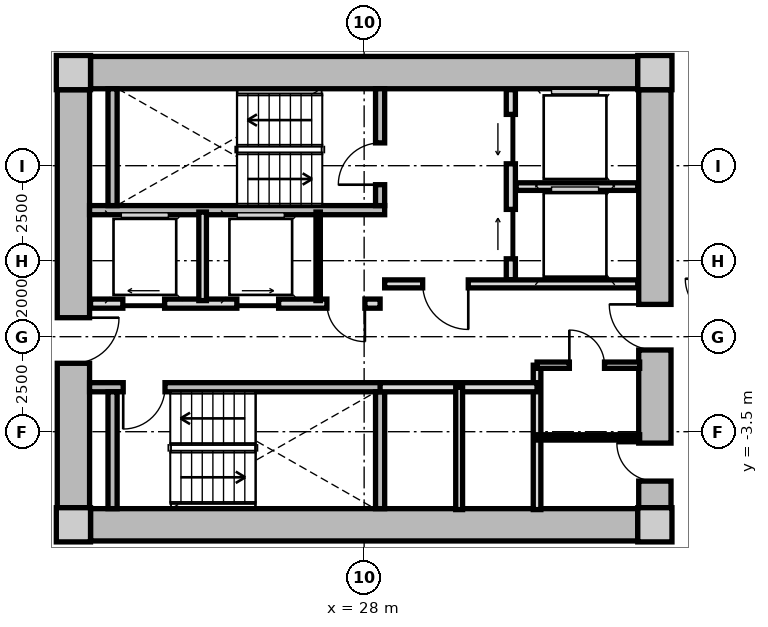
"""IFC4 building model, lengths in metres.
Left out: names, types, materials, properties, quantities, classifications, styles, units other than length and angle.
Written with IfcOpenShell. Run it as: python <this file> out.ifc"""

import sys

from ifc_helpers import new_model, si_unit, direction, frame, frame_2d, origin, origin_2d, place, context, subcontext, project, spatial, rectangle, extrude, source, transform, mapped, element, fill, save


model = new_model("IFC4")
c1 = context("Model", 3, precision=1e-05, world=origin(), true_north=direction((0.0, 1.0)))
c2 = subcontext(c1, "Body", "Model", "MODEL_VIEW")
j1 = project(units=[si_unit("LENGTHUNIT", "METRE"), si_unit("PLANEANGLEUNIT", "RADIAN")], contexts=[c1])
p1 = place(None, origin())
s1 = spatial("IfcSite", under=j1, at=p1, CompositionType="ELEMENT")
p2 = place(p1, origin())
s2 = spatial("IfcBuilding", under=s1, at=p2, CompositionType="ELEMENT")
p3 = place(p2, frame((0.0, 0.0, 58.2)))
s3 = spatial("IfcBuildingStorey", under=s2, at=p3, CompositionType="ELEMENT", Elevation=58.2)
m1 = source(origin(), c2, "Body", "SweptSolid", [
    extrude(rectangle(XDim=0.9, YDim=0.9, at=origin_2d()), origin(), (0.0, 0.0, 1.0), 3.05),
])
for number, where, z_axis, x_axis in (
    (1, (20.35, -5.95, 0.0), (0.0, 0.0, 1.0), (1.0, 0.0, 0.0)),
    (2, (35.65, -5.95, 0.0), (0.0, 0.0, 1.0), (1.0, 0.0, 0.0)),
    (3, (35.65, 5.95, 0.0), (0.0, 0.0, 1.0), (1.0, 0.0, 0.0)),
    (4, (20.35, 5.95, 0.0), (0.0, 0.0, 1.0), (1.0, 0.0, 0.0)),
):
    element("IfcColumn", number, at=place(p3, frame(where, z_axis=z_axis, x_axis=x_axis)), inside=s3, PredefinedType="COLUMN", context=c2, shape_type="MappedRepresentation", body=[
        mapped(m1, transform((0.0, 0.0, 0.0), x_axis=(1.0, 0.0, 0.0), y_axis=(0.0, 1.0, 0.0), z_axis=(0.0, 0.0, 1.0), scale=1.0)),
    ])
m2 = source(origin(), c2, "Body", "SweptSolid", [
    extrude(rectangle(XDim=14.4, YDim=0.85, at=frame_2d((7.2, 0.0))), origin(), (0.0, 0.0, 1.0), 2.79),
])
for number, where, z_axis, x_axis in (
    (5, (20.8, 5.95, 0.0), (0.0, 0.0, 1.0), (1.0, 0.0, 0.0)),
    (6, (35.2, -5.95, 0.0), (0.0, 0.0, 1.0), (-1.0, 0.0, 0.0)),
):
    element("IfcWall", number, at=place(p3, frame(where, z_axis=z_axis, x_axis=x_axis)), inside=s3, PredefinedType="SHEAR", context=c2, shape_type="MappedRepresentation", body=[
        mapped(m2, transform((0.0, 0.0, 0.0), x_axis=(1.0, 0.0, 0.0), y_axis=(0.0, 1.0, 0.0), z_axis=(0.0, 0.0, 1.0), scale=1.0)),
    ])
m3 = source(origin(), c2, "Body", "SweptSolid", [
    extrude(rectangle(XDim=11.0, YDim=0.85, at=frame_2d((5.5, 0.0))), origin(), (0.0, 0.0, 1.0), 2.79),
])
p4 = place(p3, frame((20.35, -5.5, 0.0), z_axis=(0.0, 0.0, 1.0), x_axis=(0.0, 1.0, 0.0)))
e7 = element("IfcWall", 7, at=p4, inside=s3, PredefinedType="SHEAR", context=c2, shape_type="MappedRepresentation", body=[
    mapped(m3, transform((0.0, 0.0, 0.0), x_axis=(1.0, 0.0, 0.0), y_axis=(0.0, 1.0, 0.0), z_axis=(0.0, 0.0, 1.0), scale=1.0)),
])
p5 = place(p4, frame((3.8, 0.0, 0.0)))
e8 = element("IfcOpeningElement", 8, at=p5, cuts=e7, PredefinedType="OPENING", context=c2, shape_type="SweptSolid", body=[
    extrude(rectangle(XDim=1.2, YDim=2.15, at=frame_2d((0.6, 1.075))), frame((0.0, 0.435, 0.0), z_axis=(0.0, -1.0, 0.0), x_axis=(1.0, 0.0, 0.0)), (0.0, 0.0, 1.0), 0.87),
])
p6 = place(p3, frame((35.65, 5.5, 0.0), z_axis=(0.0, 0.0, 1.0), x_axis=(0.0, -1.0, 0.0)))
e9 = element("IfcWall", 9, at=p6, inside=s3, PredefinedType="SHEAR", context=c2, shape_type="MappedRepresentation", body=[
    mapped(m3, transform((0.0, 0.0, 0.0), x_axis=(1.0, 0.0, 0.0), y_axis=(0.0, 1.0, 0.0), z_axis=(0.0, 0.0, 1.0), scale=1.0)),
])
p7 = place(p6, frame((5.65, 0.0, 0.0)))
e10 = element("IfcOpeningElement", 10, at=p7, cuts=e9, PredefinedType="OPENING", context=c2, shape_type="SweptSolid", body=[
    extrude(rectangle(XDim=1.2, YDim=2.15, at=frame_2d((0.6, 1.075))), frame((0.0, 0.435, 0.0), z_axis=(0.0, -1.0, 0.0), x_axis=(1.0, 0.0, 0.0)), (0.0, 0.0, 1.0), 0.87),
])
p8 = place(p6, frame((9.3, 0.0, 0.0)))
e11 = element("IfcOpeningElement", 11, at=p8, cuts=e9, PredefinedType="OPENING", context=c2, shape_type="SweptSolid", body=[
    extrude(rectangle(XDim=1.0, YDim=2.1, at=frame_2d((0.5, 1.05))), frame((0.0, 0.435, 0.0), z_axis=(0.0, -1.0, 0.0), x_axis=(1.0, 0.0, 0.0)), (0.0, 0.0, 1.0), 0.87),
])
m4 = source(origin(), c2, "Body", "SweptSolid", [
    extrude(rectangle(XDim=7.765, YDim=0.24, at=frame_2d((3.883, 0.0))), origin(), (0.0, 0.0, 1.0), 2.79),
])
p9 = place(p3, frame((20.775, 2.33, 0.0), z_axis=(0.0, 0.0, 1.0), x_axis=(1.0, 0.0, 0.0)))
e12 = element("IfcWall", 12, at=p9, inside=s3, PredefinedType="PARTITIONING", context=c2, shape_type="MappedRepresentation", body=[
    mapped(m4, transform((0.0, 0.0, 0.0), x_axis=(1.0, 0.0, 0.0), y_axis=(0.0, 1.0, 0.0), z_axis=(0.0, 0.0, 1.0), scale=1.0)),
])
m5 = source(origin(), c2, "Body", "SweptSolid", [
    extrude(rectangle(XDim=3.075, YDim=0.24, at=frame_2d((1.538, 0.0))), origin(), (0.0, 0.0, 1.0), 2.79),
])
p10 = place(p3, frame((21.38, 2.45, 0.0), z_axis=(0.0, 0.0, 1.0), x_axis=(0.0, 1.0, 0.0)))
e13 = element("IfcWall", 13, at=p10, inside=s3, PredefinedType="PARTITIONING", context=c2, shape_type="MappedRepresentation", body=[
    mapped(m5, transform((0.0, 0.0, 0.0), x_axis=(1.0, 0.0, 0.0), y_axis=(0.0, 1.0, 0.0), z_axis=(0.0, 0.0, 1.0), scale=1.0)),
])
p11 = place(p3, frame((28.42, 2.45, 0.0), z_axis=(0.0, 0.0, 1.0), x_axis=(0.0, 1.0, 0.0)))
e14 = element("IfcWall", 14, at=p11, inside=s3, PredefinedType="PARTITIONING", context=c2, shape_type="MappedRepresentation", body=[
    mapped(m5, transform((0.0, 0.0, 0.0), x_axis=(1.0, 0.0, 0.0), y_axis=(0.0, 1.0, 0.0), z_axis=(0.0, 0.0, 1.0), scale=1.0)),
])
p12 = place(p11, frame((0.55, 0.0, 0.0)))
e15 = element("IfcOpeningElement", 15, at=p12, cuts=e14, PredefinedType="OPENING", context=c2, shape_type="SweptSolid", body=[
    extrude(rectangle(XDim=1.1, YDim=2.15, at=frame_2d((0.55, 1.075))), frame((0.0, 0.13, 0.0), z_axis=(0.0, -1.0, 0.0), x_axis=(1.0, 0.0, 0.0)), (0.0, 0.0, 1.0), 0.26),
])
p13 = place(p3, frame((20.775, -2.33, 0.0), z_axis=(0.0, 0.0, 1.0), x_axis=(1.0, 0.0, 0.0)))
e16 = element("IfcWall", 16, at=p13, inside=s3, PredefinedType="PARTITIONING", context=c2, shape_type="MappedRepresentation", body=[
    mapped(m4, transform((0.0, 0.0, 0.0), x_axis=(1.0, 0.0, 0.0), y_axis=(0.0, 1.0, 0.0), z_axis=(0.0, 0.0, 1.0), scale=1.0)),
])
p14 = place(p13, frame((0.885, 0.0, 0.0)))
e17 = element("IfcOpeningElement", 17, at=p14, cuts=e16, PredefinedType="OPENING", context=c2, shape_type="SweptSolid", body=[
    extrude(rectangle(XDim=1.1, YDim=2.15, at=frame_2d((0.55, 1.075))), frame((0.0, 0.13, 0.0), z_axis=(0.0, -1.0, 0.0), x_axis=(1.0, 0.0, 0.0)), (0.0, 0.0, 1.0), 0.26),
])
for number, where, z_axis, x_axis in (
    (18, (21.38, -5.525, 0.0), (0.0, 0.0, 1.0), (0.0, 1.0, 0.0)),
    (19, (28.42, -5.525, 0.0), (0.0, 0.0, 1.0), (0.0, 1.0, 0.0)),
):
    element("IfcWall", number, at=place(p3, frame(where, z_axis=z_axis, x_axis=x_axis)), inside=s3, PredefinedType="PARTITIONING", context=c2, shape_type="MappedRepresentation", body=[
        mapped(m5, transform((0.0, 0.0, 0.0), x_axis=(1.0, 0.0, 0.0), y_axis=(0.0, 1.0, 0.0), z_axis=(0.0, 0.0, 1.0), scale=1.0)),
    ])
m6 = source(origin(), c2, "Body", "SweptSolid", [
    extrude(rectangle(XDim=5.0, YDim=0.24, at=frame_2d((2.5, 0.0))), origin(), (0.0, 0.0, 1.0), 2.775),
])
p15 = place(p3, frame((31.86, 0.5, 0.0), z_axis=(0.0, 0.0, 1.0), x_axis=(0.0, 1.0, 0.0)))
e20 = element("IfcWall", 20, at=p15, inside=s3, PredefinedType="PARTITIONING", context=c2, shape_type="MappedRepresentation", body=[
    mapped(m6, transform((0.0, 0.0, 0.0), x_axis=(1.0, 0.0, 0.0), y_axis=(0.0, 1.0, 0.0), z_axis=(0.0, 0.0, 1.0), scale=1.0)),
])
p16 = place(p15, frame((3.05, 0.0, 0.0)))
e21 = element("IfcOpeningElement", 21, at=p16, cuts=e20, PredefinedType="OPENING", context=c2, shape_type="SweptSolid", body=[
    extrude(rectangle(XDim=1.3, YDim=2.2, at=frame_2d((0.65, 1.1))), frame((0.0, 0.13, 0.0), z_axis=(0.0, -1.0, 0.0), x_axis=(1.0, 0.0, 0.0)), (0.0, 0.0, 1.0), 0.26),
])
p17 = place(p15, frame((0.55, 0.0, 0.0)))
e22 = element("IfcOpeningElement", 22, at=p17, cuts=e20, PredefinedType="OPENING", context=c2, shape_type="SweptSolid", body=[
    extrude(rectangle(XDim=1.3, YDim=2.2, at=frame_2d((0.65, 1.1))), frame((0.0, 0.13, 0.0), z_axis=(0.0, -1.0, 0.0), x_axis=(1.0, 0.0, 0.0)), (0.0, 0.0, 1.0), 0.26),
])
m7 = source(origin(), c2, "Body", "SweptSolid", [
    extrude(rectangle(XDim=3.2, YDim=0.2, at=frame_2d((1.6, 0.0))), origin(), (0.0, 0.0, 1.0), 2.775),
])
p18 = place(p3, frame((32.0, 2.95, 0.0), z_axis=(0.0, 0.0, 1.0), x_axis=(1.0, 0.0, 0.0)))
e23 = element("IfcWall", 23, at=p18, inside=s3, PredefinedType="PARTITIONING", context=c2, shape_type="MappedRepresentation", body=[
    mapped(m7, transform((0.0, 0.0, 0.0), x_axis=(1.0, 0.0, 0.0), y_axis=(0.0, 1.0, 0.0), z_axis=(0.0, 0.0, 1.0), scale=1.0)),
])
m8 = source(origin(), c2, "Body", "SweptSolid", [
    extrude(rectangle(XDim=6.66, YDim=0.21, at=frame_2d((3.33, 0.0))), origin(), (0.0, 0.0, 1.0), 2.775),
])
p19 = place(p3, frame((28.54, 0.39, 0.0), z_axis=(0.0, 0.0, 1.0), x_axis=(1.0, 0.0, 0.0)))
e24 = element("IfcWall", 24, at=p19, inside=s3, PredefinedType="PARTITIONING", context=c2, shape_type="MappedRepresentation", body=[
    mapped(m8, transform((0.0, 0.0, 0.0), x_axis=(1.0, 0.0, 0.0), y_axis=(0.0, 1.0, 0.0), z_axis=(0.0, 0.0, 1.0), scale=1.0)),
])
p20 = place(p19, frame((1.0, 0.0, 0.0)))
e25 = element("IfcOpeningElement", 25, at=p20, cuts=e24, PredefinedType="OPENING", context=c2, shape_type="SweptSolid", body=[
    extrude(rectangle(XDim=1.2, YDim=2.15, at=frame_2d((0.6, 1.075))), frame((0.0, 0.115, 0.0), z_axis=(0.0, -1.0, 0.0), x_axis=(1.0, 0.0, 0.0)), (0.0, 0.0, 1.0), 0.23),
])
m9 = source(origin(), c2, "Body", "SweptSolid", [
    extrude(rectangle(XDim=7.62, YDim=0.24, at=frame_2d((3.81, 0.0))), origin(), (0.0, 0.0, 1.0), 2.775),
])
p21 = place(p3, frame((20.8, -0.13, 0.0), z_axis=(0.0, 0.0, 1.0), x_axis=(1.0, 0.0, 0.0)))
e26 = element("IfcWall", 26, at=p21, inside=s3, PredefinedType="PARTITIONING", context=c2, shape_type="MappedRepresentation", body=[
    mapped(m9, transform((0.0, 0.0, 0.0), x_axis=(1.0, 0.0, 0.0), y_axis=(0.0, 1.0, 0.0), z_axis=(0.0, 0.0, 1.0), scale=1.0)),
])
p22 = place(p21, frame((6.22, 0.0, 0.0)))
e27 = element("IfcOpeningElement", 27, at=p22, cuts=e26, PredefinedType="OPENING", context=c2, shape_type="SweptSolid", body=[
    extrude(rectangle(XDim=1.0, YDim=2.1, at=frame_2d((0.5, 1.05))), frame((0.0, 0.13, 0.0), z_axis=(0.0, -1.0, 0.0), x_axis=(1.0, 0.0, 0.0)), (0.0, 0.0, 1.0), 0.26),
])
p23 = place(p21, frame((0.85, 0.0, 0.0)))
e28 = element("IfcOpeningElement", 28, at=p23, cuts=e26, PredefinedType="OPENING", context=c2, shape_type="SweptSolid", body=[
    extrude(rectangle(XDim=1.1, YDim=2.2, at=frame_2d((0.55, 1.1))), frame((0.0, 0.13, 0.0), z_axis=(0.0, -1.0, 0.0), x_axis=(1.0, 0.0, 0.0)), (0.0, 0.0, 1.0), 0.26),
])
p24 = place(p21, frame((3.85, 0.0, 0.0)))
e29 = element("IfcOpeningElement", 29, at=p24, cuts=e26, PredefinedType="OPENING", context=c2, shape_type="SweptSolid", body=[
    extrude(rectangle(XDim=1.1, YDim=2.2, at=frame_2d((0.55, 1.1))), frame((0.0, 0.13, 0.0), z_axis=(0.0, -1.0, 0.0), x_axis=(1.0, 0.0, 0.0)), (0.0, 0.0, 1.0), 0.26),
])
m10 = source(origin(), c2, "Body", "SweptSolid", [
    extrude(rectangle(XDim=2.33, YDim=0.115, at=frame_2d((1.165, 0.0))), origin(), (0.0, 0.0, 1.0), 2.775),
])
p25 = place(p3, frame((26.79, -0.05, 0.0), z_axis=(0.0, 0.0, 1.0), x_axis=(0.0, 1.0, 0.0)))
e30 = element("IfcWall", 30, at=p25, inside=s3, PredefinedType="PARTITIONING", context=c2, shape_type="MappedRepresentation", body=[
    mapped(m10, transform((0.0, 0.0, 0.0), x_axis=(1.0, 0.0, 0.0), y_axis=(0.0, 1.0, 0.0), z_axis=(0.0, 0.0, 1.0), scale=1.0)),
])
m11 = source(origin(), c2, "Body", "SweptSolid", [
    extrude(rectangle(XDim=2.33, YDim=0.2, at=frame_2d((1.165, 0.0))), origin(), (0.0, 0.0, 1.0), 2.775),
])
p26 = place(p3, frame((23.75, -0.05, 0.0), z_axis=(0.0, 0.0, 1.0), x_axis=(0.0, 1.0, 0.0)))
e31 = element("IfcWall", 31, at=p26, inside=s3, PredefinedType="PARTITIONING", context=c2, shape_type="MappedRepresentation", body=[
    mapped(m11, transform((0.0, 0.0, 0.0), x_axis=(1.0, 0.0, 0.0), y_axis=(0.0, 1.0, 0.0), z_axis=(0.0, 0.0, 1.0), scale=1.0)),
])
m12 = source(origin(), c2, "Body", "SweptSolid", [
    extrude(rectangle(XDim=3.8, YDim=0.2, at=frame_2d((1.9, 0.0))), origin(), (0.0, 0.0, 1.0), 2.775),
])
p27 = place(p3, frame((32.55, -5.55, 0.0), z_axis=(0.0, 0.0, 1.0), x_axis=(0.0, 1.0, 0.0)))
e32 = element("IfcWall", 32, at=p27, inside=s3, PredefinedType="PARTITIONING", context=c2, shape_type="MappedRepresentation", body=[
    mapped(m12, transform((0.0, 0.0, 0.0), x_axis=(1.0, 0.0, 0.0), y_axis=(0.0, 1.0, 0.0), z_axis=(0.0, 0.0, 1.0), scale=1.0)),
])
m13 = source(origin(), c2, "Body", "SweptSolid", [
    extrude(rectangle(XDim=4.13, YDim=0.24, at=frame_2d((2.065, 0.0))), origin(), (0.0, 0.0, 1.0), 2.775),
])
p28 = place(p3, frame((28.42, -2.33, 0.0), z_axis=(0.0, 0.0, 1.0), x_axis=(1.0, 0.0, 0.0)))
e33 = element("IfcWall", 33, at=p28, inside=s3, PredefinedType="PARTITIONING", context=c2, shape_type="MappedRepresentation", body=[
    mapped(m13, transform((0.0, 0.0, 0.0), x_axis=(1.0, 0.0, 0.0), y_axis=(0.0, 1.0, 0.0), z_axis=(0.0, 0.0, 1.0), scale=1.0)),
])
m14 = source(origin(), c2, "Body", "SweptSolid", [
    extrude(rectangle(XDim=3.22, YDim=0.18, at=frame_2d((1.61, 0.0))), origin(), (0.0, 0.0, 1.0), 2.775),
])
p29 = place(p3, frame((30.5, -5.55, 0.0), z_axis=(0.0, 0.0, 1.0), x_axis=(0.0, 1.0, 0.0)))
e34 = element("IfcWall", 34, at=p29, inside=s3, PredefinedType="PARTITIONING", context=c2, shape_type="MappedRepresentation", body=[
    mapped(m14, transform((0.0, 0.0, 0.0), x_axis=(1.0, 0.0, 0.0), y_axis=(0.0, 1.0, 0.0), z_axis=(0.0, 0.0, 1.0), scale=1.0)),
])
m15 = source(origin(), c2, "Body", "SweptSolid", [
    extrude(rectangle(XDim=2.7, YDim=0.165, at=frame_2d((1.35, 0.0))), origin(), (0.0, 0.0, 1.0), 2.775),
])
p30 = place(p3, frame((32.55, -1.75, 0.0), z_axis=(0.0, 0.0, 1.0), x_axis=(1.0, 0.0, 0.0)))
e35 = element("IfcWall", 35, at=p30, inside=s3, PredefinedType="PARTITIONING", context=c2, shape_type="MappedRepresentation", body=[
    mapped(m15, transform((0.0, 0.0, 0.0), x_axis=(1.0, 0.0, 0.0), y_axis=(0.0, 1.0, 0.0), z_axis=(0.0, 0.0, 1.0), scale=1.0)),
])
p31 = place(p30, frame((0.85, 0.0, 0.0)))
e36 = element("IfcOpeningElement", 36, at=p31, cuts=e35, PredefinedType="OPENING", context=c2, shape_type="SweptSolid", body=[
    extrude(rectangle(XDim=0.925, YDim=2.1, at=frame_2d((0.462, 1.05))), frame((0.0, 0.093, 0.0), z_axis=(0.0, -1.0, 0.0), x_axis=(1.0, 0.0, 0.0)), (0.0, 0.0, 1.0), 0.185),
])
m16 = source(origin(), c2, "Body", "SweptSolid", [
    extrude(rectangle(XDim=2.7, YDim=0.14, at=frame_2d((1.35, 0.0))), origin(), (0.0, 0.0, 1.0), 2.775),
])
p32 = place(p3, frame((32.55, -3.65, 0.0), z_axis=(0.0, 0.0, 1.0), x_axis=(1.0, 0.0, 0.0)))
e37 = element("IfcWall", 37, at=p32, inside=s3, PredefinedType="PARTITIONING", context=c2, shape_type="MappedRepresentation", body=[
    mapped(m16, transform((0.0, 0.0, 0.0), x_axis=(1.0, 0.0, 0.0), y_axis=(0.0, 1.0, 0.0), z_axis=(0.0, 0.0, 1.0), scale=1.0)),
])
m17 = source(origin(), c2, "Body", "SweptSolid", [
    extrude(rectangle(XDim=1.1, YDim=2.15, at=frame_2d((0.55, 1.075))), frame((0.0, 0.025, 0.0), z_axis=(0.0, -1.0, 0.0), x_axis=(1.0, 0.0, 0.0)), (0.0, 0.0, 1.0), 0.05),
])
p33 = place(p12, origin())
e38 = element("IfcDoor", 38, at=p33, inside=s3, OperationType="SINGLE_SWING_LEFT", PredefinedType="DOOR", context=c2, shape_type="MappedRepresentation", body=[
    mapped(m17, transform((0.0, 0.0, 0.0), x_axis=(1.0, 0.0, 0.0), y_axis=(0.0, 1.0, 0.0), z_axis=(0.0, 0.0, 1.0), scale=1.0)),
])
fill(e15, e38)
p34 = place(p14, frame((1.1, 0.0, 0.0), z_axis=(0.0, 0.0, 1.0), x_axis=(-1.0, 0.0, 0.0)))
e39 = element("IfcDoor", 39, at=p34, inside=s3, OperationType="SINGLE_SWING_RIGHT", PredefinedType="DOOR", context=c2, shape_type="MappedRepresentation", body=[
    mapped(m17, transform((0.0, 0.0, 0.0), x_axis=(1.0, 0.0, 0.0), y_axis=(0.0, 1.0, 0.0), z_axis=(0.0, 0.0, 1.0), scale=1.0)),
])
fill(e17, e39)
m18 = source(origin(), c2, "Body", "SweptSolid", [
    extrude(rectangle(XDim=1.3, YDim=2.2, at=frame_2d((0.65, 1.1))), frame((0.0, 0.025, 0.0), z_axis=(0.0, -1.0, 0.0), x_axis=(1.0, 0.0, 0.0)), (0.0, 0.0, 1.0), 0.05),
])
p35 = place(p16, origin())
e40 = element("IfcDoor", 40, at=p35, inside=s3, OperationType="SLIDING_TO_LEFT", PredefinedType="DOOR", context=c2, shape_type="MappedRepresentation", body=[
    mapped(m18, transform((0.0, 0.0, 0.0), x_axis=(1.0, 0.0, 0.0), y_axis=(0.0, 1.0, 0.0), z_axis=(0.0, 0.0, 1.0), scale=1.0)),
])
fill(e21, e40)
p36 = place(p17, origin())
e41 = element("IfcDoor", 41, at=p36, inside=s3, OperationType="SLIDING_TO_RIGHT", PredefinedType="DOOR", context=c2, shape_type="MappedRepresentation", body=[
    mapped(m18, transform((0.0, 0.0, 0.0), x_axis=(1.0, 0.0, 0.0), y_axis=(0.0, 1.0, 0.0), z_axis=(0.0, 0.0, 1.0), scale=1.0)),
])
fill(e22, e41)
m19 = source(origin(), c2, "Body", "SweptSolid", [
    extrude(rectangle(XDim=1.2, YDim=2.15, at=frame_2d((0.6, 1.075))), frame((0.0, 0.025, 0.0), z_axis=(0.0, -1.0, 0.0), x_axis=(1.0, 0.0, 0.0)), (0.0, 0.0, 1.0), 0.05),
])
p37 = place(p20, frame((1.2, 0.0, 0.0), z_axis=(0.0, 0.0, 1.0), x_axis=(-1.0, 0.0, 0.0)))
e42 = element("IfcDoor", 42, at=p37, inside=s3, OperationType="SINGLE_SWING_LEFT", PredefinedType="DOOR", context=c2, shape_type="MappedRepresentation", body=[
    mapped(m19, transform((0.0, 0.0, 0.0), x_axis=(1.0, 0.0, 0.0), y_axis=(0.0, 1.0, 0.0), z_axis=(0.0, 0.0, 1.0), scale=1.0)),
])
fill(e25, e42)
p38 = place(p5, frame((1.2, 0.0, 0.0), z_axis=(0.0, 0.0, 1.0), x_axis=(-1.0, 0.0, 0.0)))
e43 = element("IfcDoor", 43, at=p38, inside=s3, OperationType="SINGLE_SWING_LEFT", PredefinedType="DOOR", context=c2, shape_type="MappedRepresentation", body=[
    mapped(m19, transform((0.0, 0.0, 0.0), x_axis=(1.0, 0.0, 0.0), y_axis=(0.0, 1.0, 0.0), z_axis=(0.0, 0.0, 1.0), scale=1.0)),
])
fill(e8, e43)
p39 = place(p7, frame((1.2, 0.0, 0.0), z_axis=(0.0, 0.0, 1.0), x_axis=(-1.0, 0.0, 0.0)))
e44 = element("IfcDoor", 44, at=p39, inside=s3, OperationType="SINGLE_SWING_RIGHT", PredefinedType="DOOR", context=c2, shape_type="MappedRepresentation", body=[
    mapped(m19, transform((0.0, 0.0, 0.0), x_axis=(1.0, 0.0, 0.0), y_axis=(0.0, 1.0, 0.0), z_axis=(0.0, 0.0, 1.0), scale=1.0)),
])
fill(e10, e44)
m20 = source(origin(), c2, "Body", "SweptSolid", [
    extrude(rectangle(XDim=1.0, YDim=2.1, at=frame_2d((0.5, 1.05))), frame((0.0, 0.025, 0.0), z_axis=(0.0, -1.0, 0.0), x_axis=(1.0, 0.0, 0.0)), (0.0, 0.0, 1.0), 0.05),
])
p40 = place(p22, frame((1.0, 0.0, 0.0), z_axis=(0.0, 0.0, 1.0), x_axis=(-1.0, 0.0, 0.0)))
e45 = element("IfcDoor", 45, at=p40, inside=s3, OperationType="SINGLE_SWING_LEFT", PredefinedType="DOOR", context=c2, shape_type="MappedRepresentation", body=[
    mapped(m20, transform((0.0, 0.0, 0.0), x_axis=(1.0, 0.0, 0.0), y_axis=(0.0, 1.0, 0.0), z_axis=(0.0, 0.0, 1.0), scale=1.0)),
])
fill(e27, e45)
m21 = source(origin(), c2, "Body", "SweptSolid", [
    extrude(rectangle(XDim=1.1, YDim=2.2, at=frame_2d((0.55, 1.1))), frame((0.0, 0.025, 0.0), z_axis=(0.0, -1.0, 0.0), x_axis=(1.0, 0.0, 0.0)), (0.0, 0.0, 1.0), 0.05),
])
p41 = place(p23, origin())
e46 = element("IfcDoor", 46, at=p41, inside=s3, OperationType="SLIDING_TO_LEFT", PredefinedType="DOOR", context=c2, shape_type="MappedRepresentation", body=[
    mapped(m21, transform((0.0, 0.0, 0.0), x_axis=(1.0, 0.0, 0.0), y_axis=(0.0, 1.0, 0.0), z_axis=(0.0, 0.0, 1.0), scale=1.0)),
])
fill(e28, e46)
p42 = place(p24, origin())
e47 = element("IfcDoor", 47, at=p42, inside=s3, OperationType="SLIDING_TO_RIGHT", PredefinedType="DOOR", context=c2, shape_type="MappedRepresentation", body=[
    mapped(m21, transform((0.0, 0.0, 0.0), x_axis=(1.0, 0.0, 0.0), y_axis=(0.0, 1.0, 0.0), z_axis=(0.0, 0.0, 1.0), scale=1.0)),
])
fill(e29, e47)
m22 = source(origin(), c2, "Body", "SweptSolid", [
    extrude(rectangle(XDim=0.925, YDim=2.1, at=frame_2d((0.462, 1.05))), frame((0.0, 0.025, 0.0), z_axis=(0.0, -1.0, 0.0), x_axis=(1.0, 0.0, 0.0)), (0.0, 0.0, 1.0), 0.05),
])
p43 = place(p31, origin())
e48 = element("IfcDoor", 48, at=p43, inside=s3, OperationType="SINGLE_SWING_LEFT", PredefinedType="DOOR", context=c2, shape_type="MappedRepresentation", body=[
    mapped(m22, transform((0.0, 0.0, 0.0), x_axis=(1.0, 0.0, 0.0), y_axis=(0.0, 1.0, 0.0), z_axis=(0.0, 0.0, 1.0), scale=1.0)),
])
fill(e36, e48)
p44 = place(p8, frame((1.0, 0.0, 0.0), z_axis=(0.0, 0.0, 1.0), x_axis=(-1.0, 0.0, 0.0)))
e49 = element("IfcDoor", 49, at=p44, inside=s3, OperationType="SINGLE_SWING_RIGHT", PredefinedType="DOOR", context=c2, shape_type="MappedRepresentation", body=[
    mapped(m20, transform((0.0, 0.0, 0.0), x_axis=(1.0, 0.0, 0.0), y_axis=(0.0, 1.0, 0.0), z_axis=(0.0, 0.0, 1.0), scale=1.0)),
])
fill(e11, e49)
save(model, sys.argv[1])
